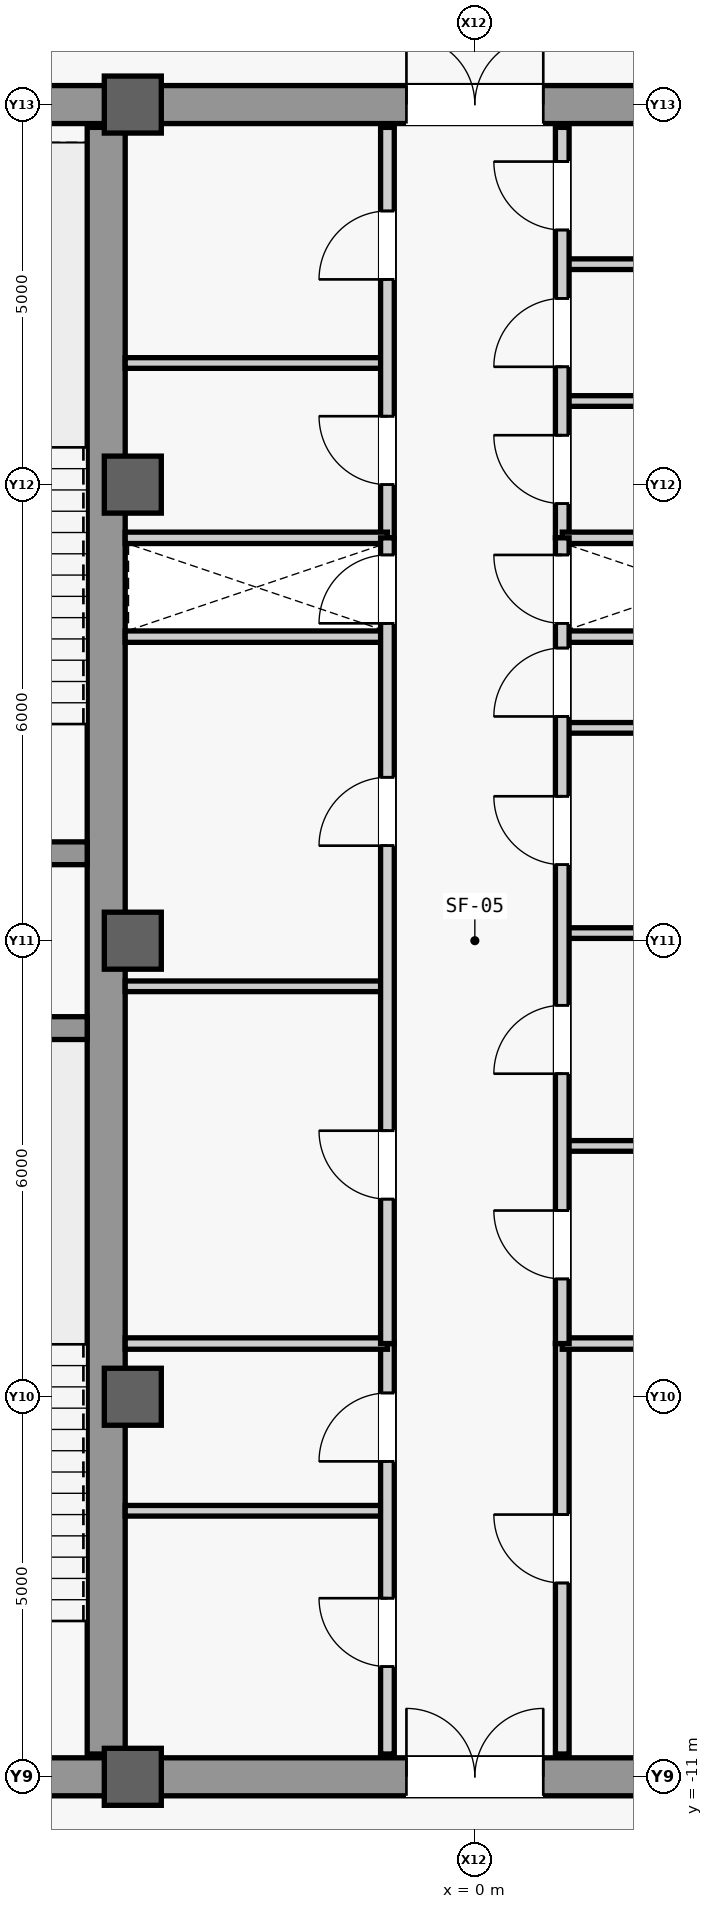
"""IFC4 building model, lengths in metres.
Left out: names, types, materials, properties, quantities, classifications, styles, units other than length and angle.
Written with IfcOpenShell. Run it as: python <this file> out.ifc"""

import sys

from ifc_helpers import new_model, si_unit, direction, frame, frame_2d, origin, origin_2d, place, context, subcontext, project, spatial, rectangle, extrude, source, transform, mapped, element, fill, save


model = new_model("IFC4")
c1 = context("Model", 3, precision=1e-05, world=origin(), true_north=direction((0.0, 1.0)))
c2 = subcontext(c1, "Body", "Model", "MODEL_VIEW")
j1 = project(units=[si_unit("LENGTHUNIT", "METRE"), si_unit("PLANEANGLEUNIT", "RADIAN")], contexts=[c1])
p1 = place(None, origin())
s1 = spatial("IfcSite", under=j1, at=p1, CompositionType="ELEMENT")
p2 = place(p1, origin())
s2 = spatial("IfcBuilding", under=s1, at=p2, CompositionType="ELEMENT")
p3 = place(p2, frame((0.0, 0.0, 380.3)))
s3 = spatial("IfcBuildingStorey", under=s2, at=p3, CompositionType="ELEMENT", Elevation=380.3)
m1 = source(origin(), c2, "Body", "SweptSolid", [
    extrude(rectangle(XDim=21.4, YDim=0.5, at=frame_2d((10.7, 0.0))), origin(), (0.0, 0.0, 1.0), 4.45),
])
p4 = place(p3, frame((-4.85, -10.7, 0.0), z_axis=(0.0, 0.0, 1.0), x_axis=(0.0, 1.0, 0.0)))
e1 = element("IfcWall", 1, at=p4, inside=s3, PredefinedType="SHEAR", context=c2, shape_type="MappedRepresentation", body=[
    mapped(m1, transform((0.0, 0.0, 0.0), scale=1.0)),
])
m2 = source(origin(), c2, "Body", "SweptSolid", [
    extrude(rectangle(XDim=5.9, YDim=0.5, at=frame_2d((2.95, 0.0))), origin(), (0.0, 0.0, 1.0), 4.45),
])
for number, where, z_axis, x_axis in (
    (2, (-10.75, -11.0, 0.0), (0.0, 0.0, 1.0), (1.0, 0.0, 0.0)),
    (3, (-10.75, 11.0, 0.0), (0.0, 0.0, 1.0), (1.0, 0.0, 0.0)),
):
    element("IfcWall", number, at=place(p3, frame(where, z_axis=z_axis, x_axis=x_axis)), inside=s3, PredefinedType="SHEAR", context=c2, shape_type="MappedRepresentation", body=[
        mapped(m2, transform((0.0, 0.0, 0.0), scale=1.0)),
    ])
m3 = source(origin(), c2, "Body", "SweptSolid", [
    extrude(rectangle(XDim=5.65, YDim=0.3, at=frame_2d((2.825, 0.0))), origin(), (0.0, 0.0, 1.0), 4.45),
])
for number, where, z_axis, x_axis in (
    (4, (-10.75, -1.15, 0.0), (0.0, 0.0, 1.0), (1.0, 0.0, 0.0)),
    (5, (-10.75, 1.15, 0.0), (0.0, 0.0, 1.0), (1.0, 0.0, 0.0)),
):
    element("IfcWall", number, at=place(p3, frame(where, z_axis=z_axis, x_axis=x_axis)), inside=s3, PredefinedType="SHEAR", context=c2, shape_type="MappedRepresentation", body=[
        mapped(m3, transform((0.0, 0.0, 0.0), scale=1.0)),
    ])
m4 = source(origin(), c2, "Body", "SweptSolid", [
    extrude(rectangle(XDim=9.2, YDim=0.5, at=frame_2d((4.6, 0.0))), origin(), (0.0, 0.0, 1.0), 4.45),
])
p5 = place(p3, frame((-4.6, -11.0, 0.0), z_axis=(0.0, 0.0, 1.0), x_axis=(1.0, 0.0, 0.0)))
e6 = element("IfcWall", 6, at=p5, inside=s3, PredefinedType="SHEAR", context=c2, shape_type="MappedRepresentation", body=[
    mapped(m4, transform((0.0, 0.0, 0.0), scale=1.0)),
])
m5 = source(origin(), c2, "Body", "SweptSolid", [
    extrude(rectangle(XDim=1.8, YDim=2.25, at=frame_2d((0.9, 1.125))), frame((0.0, 0.26, 0.0), z_axis=(0.0, -1.0, 0.0), x_axis=(1.0, 0.0, 0.0)), (0.0, 0.0, 1.0), 0.52),
])
p6 = place(p5, frame((3.7, 0.0, 0.0)))
e7 = element("IfcOpeningElement", 7, at=p6, cuts=e6, PredefinedType="OPENING", context=c2, shape_type="MappedRepresentation", body=[
    mapped(m5, transform((0.0, 0.0, 0.0), scale=1.0)),
])
p7 = place(p3, frame((-4.6, 11.0, 0.0), z_axis=(0.0, 0.0, 1.0), x_axis=(1.0, 0.0, 0.0)))
e8 = element("IfcWall", 8, at=p7, inside=s3, PredefinedType="SHEAR", context=c2, shape_type="MappedRepresentation", body=[
    mapped(m4, transform((0.0, 0.0, 0.0), scale=1.0)),
])
p8 = place(p7, frame((3.7, 0.0, 0.0)))
e9 = element("IfcOpeningElement", 9, at=p8, cuts=e8, PredefinedType="OPENING", context=c2, shape_type="MappedRepresentation", body=[
    mapped(m5, transform((0.0, 0.0, 0.0), scale=1.0)),
])
m6 = source(origin(), c2, "Body", "SweptSolid", [
    extrude(rectangle(XDim=0.75, YDim=0.75, at=origin_2d()), origin(), (0.0, 0.0, 1.0), 4.8),
])
for number, where, z_axis, x_axis in (
    (10, (-4.5, -11.0, 0.0), (0.0, 0.0, 1.0), (1.0, 0.0, 0.0)),
    (11, (-4.5, -6.0, 0.0), (0.0, 0.0, 1.0), (1.0, 0.0, 0.0)),
    (12, (-4.5, 0.0, 0.0), (0.0, 0.0, 1.0), (1.0, 0.0, 0.0)),
    (13, (-4.5, 6.0, 0.0), (0.0, 0.0, 1.0), (1.0, 0.0, 0.0)),
    (14, (-4.5, 11.0, 0.0), (0.0, 0.0, 1.0), (1.0, 0.0, 0.0)),
):
    element("IfcColumn", number, at=place(p3, frame(where, z_axis=z_axis, x_axis=x_axis)), inside=s3, PredefinedType="COLUMN", context=c2, shape_type="MappedRepresentation", body=[
        mapped(m6, transform((0.0, 0.0, 0.0), scale=1.0)),
    ])
m7 = source(origin(), c2, "Body", "SweptSolid", [
    extrude(rectangle(XDim=3.45, YDim=0.15, at=frame_2d((1.725, 0.0))), origin(), (0.0, 0.0, 1.0), 4.45),
])
for number, where, z_axis, x_axis in (
    (15, (-4.6, 4.0, 0.0), (0.0, 0.0, 1.0), (1.0, 0.0, 0.0)),
    (16, (1.15, 4.0, 0.0), (0.0, 0.0, 1.0), (1.0, 0.0, 0.0)),
):
    element("IfcWall", number, at=place(p3, frame(where, z_axis=z_axis, x_axis=x_axis)), inside=s3, PredefinedType="PARTITIONING", context=c2, shape_type="MappedRepresentation", body=[
        mapped(m7, transform((0.0, 0.0, 0.0), scale=1.0)),
    ])
m8 = source(origin(), c2, "Body", "SweptSolid", [
    extrude(rectangle(XDim=3.45, YDim=0.14, at=frame_2d((1.725, 0.0))), origin(), (0.0, 0.0, 1.0), 4.45),
])
p9 = place(p3, frame((-4.6, -7.5, 0.0), z_axis=(0.0, 0.0, 1.0), x_axis=(1.0, 0.0, 0.0)))
e17 = element("IfcWall", 17, at=p9, inside=s3, PredefinedType="PARTITIONING", context=c2, shape_type="MappedRepresentation", body=[
    mapped(m8, transform((0.0, 0.0, 0.0), scale=1.0)),
])
m9 = source(origin(), c2, "Body", "SweptSolid", [
    extrude(rectangle(XDim=5.4, YDim=0.18, at=frame_2d((2.7, 0.0))), origin(), (0.0, 0.0, 1.0), 4.45),
])
p10 = place(p3, frame((-1.15, -10.7, 0.0), z_axis=(0.0, 0.0, 1.0), x_axis=(0.0, 1.0, 0.0)))
e18 = element("IfcWall", 18, at=p10, inside=s3, PredefinedType="PARTITIONING", context=c2, shape_type="MappedRepresentation", body=[
    mapped(m9, transform((0.0, 0.0, 0.0), scale=1.0)),
])
m10 = source(origin(), c2, "Body", "SweptSolid", [
    extrude(rectangle(XDim=0.9, YDim=2.15, at=frame_2d((0.45, 1.075))), frame((0.0, 0.1, 0.0), z_axis=(0.0, -1.0, 0.0), x_axis=(1.0, 0.0, 0.0)), (0.0, 0.0, 1.0), 0.2),
])
p11 = place(p10, frame((1.15, 0.0, 0.0)))
e19 = element("IfcOpeningElement", 19, at=p11, cuts=e18, PredefinedType="OPENING", context=c2, shape_type="MappedRepresentation", body=[
    mapped(m10, transform((0.0, 0.0, 0.0), scale=1.0)),
])
p12 = place(p10, frame((3.85, 0.0, 0.0)))
e20 = element("IfcOpeningElement", 20, at=p12, cuts=e18, PredefinedType="OPENING", context=c2, shape_type="MappedRepresentation", body=[
    mapped(m10, transform((0.0, 0.0, 0.0), scale=1.0)),
])
p13 = place(p3, frame((1.15, -10.7, 0.0), z_axis=(0.0, 0.0, 1.0), x_axis=(0.0, 1.0, 0.0)))
e21 = element("IfcWall", 21, at=p13, inside=s3, PredefinedType="PARTITIONING", context=c2, shape_type="MappedRepresentation", body=[
    mapped(m9, transform((0.0, 0.0, 0.0), scale=1.0)),
])
p14 = place(p13, frame((2.25, 0.0, 0.0)))
e22 = element("IfcOpeningElement", 22, at=p14, cuts=e21, PredefinedType="OPENING", context=c2, shape_type="MappedRepresentation", body=[
    mapped(m10, transform((0.0, 0.0, 0.0), scale=1.0)),
])
for number, where, z_axis, x_axis in (
    (23, (-4.6, -5.3, 0.0), (0.0, 0.0, 1.0), (1.0, 0.0, 0.0)),
    (24, (1.15, -5.3, 0.0), (0.0, 0.0, 1.0), (1.0, 0.0, 0.0)),
):
    element("IfcWall", number, at=place(p3, frame(where, z_axis=z_axis, x_axis=x_axis)), inside=s3, PredefinedType="PARTITIONING", context=c2, shape_type="MappedRepresentation", body=[
        mapped(m7, transform((0.0, 0.0, 0.0), scale=1.0)),
    ])
p15 = place(p3, frame((-4.6, 7.6, 0.0), z_axis=(0.0, 0.0, 1.0), x_axis=(1.0, 0.0, 0.0)))
e25 = element("IfcWall", 25, at=p15, inside=s3, PredefinedType="PARTITIONING", context=c2, shape_type="MappedRepresentation", body=[
    mapped(m8, transform((0.0, 0.0, 0.0), scale=1.0)),
])
p16 = place(p3, frame((-1.15, 5.3, 0.0), z_axis=(0.0, 0.0, 1.0), x_axis=(0.0, 1.0, 0.0)))
e26 = element("IfcWall", 26, at=p16, inside=s3, PredefinedType="PARTITIONING", context=c2, shape_type="MappedRepresentation", body=[
    mapped(m9, transform((0.0, 0.0, 0.0), scale=1.0)),
])
p17 = place(p16, frame((0.7, 0.0, 0.0)))
e27 = element("IfcOpeningElement", 27, at=p17, cuts=e26, PredefinedType="OPENING", context=c2, shape_type="MappedRepresentation", body=[
    mapped(m10, transform((0.0, 0.0, 0.0), scale=1.0)),
])
p18 = place(p16, frame((3.4, 0.0, 0.0)))
e28 = element("IfcOpeningElement", 28, at=p18, cuts=e26, PredefinedType="OPENING", context=c2, shape_type="MappedRepresentation", body=[
    mapped(m10, transform((0.0, 0.0, 0.0), scale=1.0)),
])
for number, where, z_axis, x_axis in (
    (29, (1.15, 7.1, 0.0), (0.0, 0.0, 1.0), (1.0, 0.0, 0.0)),
    (30, (1.15, 8.9, 0.0), (0.0, 0.0, 1.0), (1.0, 0.0, 0.0)),
):
    element("IfcWall", number, at=place(p3, frame(where, z_axis=z_axis, x_axis=x_axis)), inside=s3, PredefinedType="PARTITIONING", context=c2, shape_type="MappedRepresentation", body=[
        mapped(m8, transform((0.0, 0.0, 0.0), scale=1.0)),
    ])
p19 = place(p3, frame((1.15, 5.3, 0.0), z_axis=(0.0, 0.0, 1.0), x_axis=(0.0, 1.0, 0.0)))
e31 = element("IfcWall", 31, at=p19, inside=s3, PredefinedType="PARTITIONING", context=c2, shape_type="MappedRepresentation", body=[
    mapped(m9, transform((0.0, 0.0, 0.0), scale=1.0)),
])
p20 = place(p19, frame((0.45, 0.0, 0.0)))
e32 = element("IfcOpeningElement", 32, at=p20, cuts=e31, PredefinedType="OPENING", context=c2, shape_type="MappedRepresentation", body=[
    mapped(m10, transform((0.0, 0.0, 0.0), scale=1.0)),
])
p21 = place(p19, frame((2.25, 0.0, 0.0)))
e33 = element("IfcOpeningElement", 33, at=p21, cuts=e31, PredefinedType="OPENING", context=c2, shape_type="MappedRepresentation", body=[
    mapped(m10, transform((0.0, 0.0, 0.0), scale=1.0)),
])
p22 = place(p19, frame((4.05, 0.0, 0.0)))
e34 = element("IfcOpeningElement", 34, at=p22, cuts=e31, PredefinedType="OPENING", context=c2, shape_type="MappedRepresentation", body=[
    mapped(m10, transform((0.0, 0.0, 0.0), scale=1.0)),
])
for number, where, z_axis, x_axis in (
    (35, (-4.6, 5.3, 0.0), (0.0, 0.0, 1.0), (1.0, 0.0, 0.0)),
    (36, (1.15, 5.3, 0.0), (0.0, 0.0, 1.0), (1.0, 0.0, 0.0)),
):
    element("IfcWall", number, at=place(p3, frame(where, z_axis=z_axis, x_axis=x_axis)), inside=s3, PredefinedType="PARTITIONING", context=c2, shape_type="MappedRepresentation", body=[
        mapped(m7, transform((0.0, 0.0, 0.0), scale=1.0)),
    ])
p23 = place(p3, frame((-4.6, -0.6, 0.0), z_axis=(0.0, 0.0, 1.0), x_axis=(1.0, 0.0, 0.0)))
e37 = element("IfcWall", 37, at=p23, inside=s3, PredefinedType="PARTITIONING", context=c2, shape_type="MappedRepresentation", body=[
    mapped(m8, transform((0.0, 0.0, 0.0), scale=1.0)),
])
m11 = source(origin(), c2, "Body", "SweptSolid", [
    extrude(rectangle(XDim=10.6, YDim=0.18, at=frame_2d((5.3, 0.0))), origin(), (0.0, 0.0, 1.0), 4.45),
])
p24 = place(p3, frame((-1.15, -5.3, 0.0), z_axis=(0.0, 0.0, 1.0), x_axis=(0.0, 1.0, 0.0)))
e38 = element("IfcWall", 38, at=p24, inside=s3, PredefinedType="PARTITIONING", context=c2, shape_type="MappedRepresentation", body=[
    mapped(m11, transform((0.0, 0.0, 0.0), scale=1.0)),
])
p25 = place(p24, frame((1.9, 0.0, 0.0)))
e39 = element("IfcOpeningElement", 39, at=p25, cuts=e38, PredefinedType="OPENING", context=c2, shape_type="MappedRepresentation", body=[
    mapped(m10, transform((0.0, 0.0, 0.0), scale=1.0)),
])
p26 = place(p24, frame((6.55, 0.0, 0.0)))
e40 = element("IfcOpeningElement", 40, at=p26, cuts=e38, PredefinedType="OPENING", context=c2, shape_type="MappedRepresentation", body=[
    mapped(m10, transform((0.0, 0.0, 0.0), scale=1.0)),
])
p27 = place(p24, frame((9.475, 0.0, 0.0)))
e41 = element("IfcOpeningElement", 41, at=p27, cuts=e38, PredefinedType="OPENING", context=c2, shape_type="MappedRepresentation", body=[
    mapped(m10, transform((0.0, 0.0, 0.0), scale=1.0)),
])
p28 = place(p3, frame((1.15, -2.7, 0.0), z_axis=(0.0, 0.0, 1.0), x_axis=(1.0, 0.0, 0.0)))
e42 = element("IfcWall", 42, at=p28, inside=s3, PredefinedType="PARTITIONING", context=c2, shape_type="MappedRepresentation", body=[
    mapped(m8, transform((0.0, 0.0, 0.0), scale=1.0)),
])
m12 = source(origin(), c2, "Body", "SweptSolid", [
    extrude(rectangle(XDim=3.45, YDim=0.14, at=frame_2d((1.725, 0.0))), origin(), (0.0, 0.0, 1.0), 3.755),
])
p29 = place(p3, frame((1.15, 0.1, 0.0), z_axis=(0.0, 0.0, 1.0), x_axis=(1.0, 0.0, 0.0)))
e43 = element("IfcWall", 43, at=p29, inside=s3, PredefinedType="PARTITIONING", context=c2, shape_type="MappedRepresentation", body=[
    mapped(m12, transform((0.0, 0.0, 0.0), scale=1.0)),
])
p30 = place(p3, frame((1.15, 2.8, 0.0), z_axis=(0.0, 0.0, 1.0), x_axis=(1.0, 0.0, 0.0)))
e44 = element("IfcWall", 44, at=p30, inside=s3, PredefinedType="PARTITIONING", context=c2, shape_type="MappedRepresentation", body=[
    mapped(m8, transform((0.0, 0.0, 0.0), scale=1.0)),
])
p31 = place(p3, frame((1.15, -5.3, 0.0), z_axis=(0.0, 0.0, 1.0), x_axis=(0.0, 1.0, 0.0)))
e45 = element("IfcWall", 45, at=p31, inside=s3, PredefinedType="PARTITIONING", context=c2, shape_type="MappedRepresentation", body=[
    mapped(m11, transform((0.0, 0.0, 0.0), scale=1.0)),
])
p32 = place(p31, frame((0.85, 0.0, 0.0)))
e46 = element("IfcOpeningElement", 46, at=p32, cuts=e45, PredefinedType="OPENING", context=c2, shape_type="MappedRepresentation", body=[
    mapped(m10, transform((0.0, 0.0, 0.0), scale=1.0)),
])
p33 = place(p31, frame((3.55, 0.0, 0.0)))
e47 = element("IfcOpeningElement", 47, at=p33, cuts=e45, PredefinedType="OPENING", context=c2, shape_type="MappedRepresentation", body=[
    mapped(m10, transform((0.0, 0.0, 0.0), scale=1.0)),
])
p34 = place(p31, frame((6.3, 0.0, 0.0)))
e48 = element("IfcOpeningElement", 48, at=p34, cuts=e45, PredefinedType="OPENING", context=c2, shape_type="MappedRepresentation", body=[
    mapped(m10, transform((0.0, 0.0, 0.0), scale=1.0)),
])
p35 = place(p31, frame((8.25, 0.0, 0.0)))
e49 = element("IfcOpeningElement", 49, at=p35, cuts=e45, PredefinedType="OPENING", context=c2, shape_type="MappedRepresentation", body=[
    mapped(m10, transform((0.0, 0.0, 0.0), scale=1.0)),
])
p36 = place(p31, frame((9.475, 0.0, 0.0)))
e50 = element("IfcOpeningElement", 50, at=p36, cuts=e45, PredefinedType="OPENING", context=c2, shape_type="MappedRepresentation", body=[
    mapped(m10, transform((0.0, 0.0, 0.0), scale=1.0)),
])
m13 = source(origin(), c2, "Body", "SweptSolid", [
    extrude(rectangle(XDim=0.9, YDim=2.15, at=frame_2d((0.45, 1.075))), frame((0.0, 0.025, 0.0), z_axis=(0.0, -1.0, 0.0), x_axis=(1.0, 0.0, 0.0)), (0.0, 0.0, 1.0), 0.05),
])
p37 = place(p11, origin())
e51 = element("IfcDoor", 51, at=p37, inside=s3, OperationType="SINGLE_SWING_RIGHT", PredefinedType="DOOR", context=c2, shape_type="MappedRepresentation", body=[
    mapped(m13, transform((0.0, 0.0, 0.0), scale=1.0)),
])
fill(e19, e51)
p38 = place(p12, origin())
e52 = element("IfcDoor", 52, at=p38, inside=s3, OperationType="SINGLE_SWING_LEFT", PredefinedType="DOOR", context=c2, shape_type="MappedRepresentation", body=[
    mapped(m13, transform((0.0, 0.0, 0.0), scale=1.0)),
])
fill(e20, e52)
p39 = place(p14, origin())
e53 = element("IfcDoor", 53, at=p39, inside=s3, OperationType="SINGLE_SWING_RIGHT", PredefinedType="DOOR", context=c2, shape_type="MappedRepresentation", body=[
    mapped(m13, transform((0.0, 0.0, 0.0), scale=1.0)),
])
fill(e22, e53)
m14 = source(origin(), c2, "Body", "SweptSolid", [
    extrude(rectangle(XDim=1.8, YDim=2.25, at=frame_2d((0.9, 1.125))), frame((0.0, 0.025, 0.0), z_axis=(0.0, -1.0, 0.0), x_axis=(1.0, 0.0, 0.0)), (0.0, 0.0, 1.0), 0.05),
])
p40 = place(p6, origin())
e54 = element("IfcDoor", 54, at=p40, inside=s3, OperationType="SINGLE_SWING_LEFT", PredefinedType="DOOR", context=c2, shape_type="MappedRepresentation", body=[
    mapped(m14, transform((0.0, 0.0, 0.0), scale=1.0)),
])
fill(e7, e54)
p41 = place(p17, origin())
e55 = element("IfcDoor", 55, at=p41, inside=s3, OperationType="SINGLE_SWING_RIGHT", PredefinedType="DOOR", context=c2, shape_type="MappedRepresentation", body=[
    mapped(m13, transform((0.0, 0.0, 0.0), scale=1.0)),
])
fill(e27, e55)
p42 = place(p18, origin())
e56 = element("IfcDoor", 56, at=p42, inside=s3, OperationType="SINGLE_SWING_LEFT", PredefinedType="DOOR", context=c2, shape_type="MappedRepresentation", body=[
    mapped(m13, transform((0.0, 0.0, 0.0), scale=1.0)),
])
fill(e28, e56)
p43 = place(p20, origin())
e57 = element("IfcDoor", 57, at=p43, inside=s3, OperationType="SINGLE_SWING_RIGHT", PredefinedType="DOOR", context=c2, shape_type="MappedRepresentation", body=[
    mapped(m13, transform((0.0, 0.0, 0.0), scale=1.0)),
])
fill(e32, e57)
p44 = place(p21, origin())
e58 = element("IfcDoor", 58, at=p44, inside=s3, OperationType="SINGLE_SWING_LEFT", PredefinedType="DOOR", context=c2, shape_type="MappedRepresentation", body=[
    mapped(m13, transform((0.0, 0.0, 0.0), scale=1.0)),
])
fill(e33, e58)
p45 = place(p22, origin())
e59 = element("IfcDoor", 59, at=p45, inside=s3, OperationType="SINGLE_SWING_RIGHT", PredefinedType="DOOR", context=c2, shape_type="MappedRepresentation", body=[
    mapped(m13, transform((0.0, 0.0, 0.0), scale=1.0)),
])
fill(e34, e59)
p46 = place(p8, origin())
e60 = element("IfcDoor", 60, at=p46, inside=s3, OperationType="SINGLE_SWING_RIGHT", PredefinedType="DOOR", context=c2, shape_type="MappedRepresentation", body=[
    mapped(m14, transform((0.0, 0.0, 0.0), scale=1.0)),
])
fill(e9, e60)
p47 = place(p25, origin())
e61 = element("IfcDoor", 61, at=p47, inside=s3, OperationType="SINGLE_SWING_RIGHT", PredefinedType="DOOR", context=c2, shape_type="MappedRepresentation", body=[
    mapped(m13, transform((0.0, 0.0, 0.0), scale=1.0)),
])
fill(e39, e61)
p48 = place(p26, origin())
e62 = element("IfcDoor", 62, at=p48, inside=s3, OperationType="SINGLE_SWING_LEFT", PredefinedType="DOOR", context=c2, shape_type="MappedRepresentation", body=[
    mapped(m13, transform((0.0, 0.0, 0.0), scale=1.0)),
])
fill(e40, e62)
p49 = place(p32, origin())
e63 = element("IfcDoor", 63, at=p49, inside=s3, OperationType="SINGLE_SWING_RIGHT", PredefinedType="DOOR", context=c2, shape_type="MappedRepresentation", body=[
    mapped(m13, transform((0.0, 0.0, 0.0), scale=1.0)),
])
fill(e46, e63)
p50 = place(p33, origin())
e64 = element("IfcDoor", 64, at=p50, inside=s3, OperationType="SINGLE_SWING_LEFT", PredefinedType="DOOR", context=c2, shape_type="MappedRepresentation", body=[
    mapped(m13, transform((0.0, 0.0, 0.0), scale=1.0)),
])
fill(e47, e64)
p51 = place(p34, origin())
e65 = element("IfcDoor", 65, at=p51, inside=s3, OperationType="SINGLE_SWING_RIGHT", PredefinedType="DOOR", context=c2, shape_type="MappedRepresentation", body=[
    mapped(m13, transform((0.0, 0.0, 0.0), scale=1.0)),
])
fill(e48, e65)
p52 = place(p35, origin())
e66 = element("IfcDoor", 66, at=p52, inside=s3, OperationType="SINGLE_SWING_LEFT", PredefinedType="DOOR", context=c2, shape_type="MappedRepresentation", body=[
    mapped(m13, transform((0.0, 0.0, 0.0), scale=1.0)),
])
fill(e49, e66)
p53 = place(p27, origin())
e67 = element("IfcDoor", 67, at=p53, inside=s3, OperationType="SINGLE_SWING_LEFT", PredefinedType="DOOR", context=c2, shape_type="MappedRepresentation", body=[
    mapped(m13, transform((0.0, 0.0, 0.0), scale=1.0)),
])
fill(e41, e67)
p54 = place(p36, origin())
e68 = element("IfcDoor", 68, at=p54, inside=s3, OperationType="SINGLE_SWING_RIGHT", PredefinedType="DOOR", context=c2, shape_type="MappedRepresentation", body=[
    mapped(m13, transform((0.0, 0.0, 0.0), scale=1.0)),
])
fill(e50, e68)
save(model, sys.argv[1])
